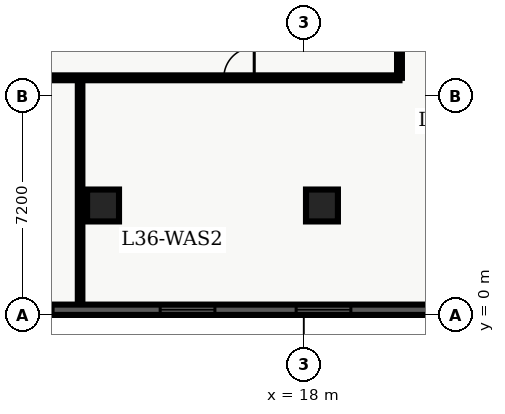
"""IFC4 building model, lengths in metres.
Left out: names, types, materials, properties, quantities, classifications, styles, units other than length and angle.
Written with IfcOpenShell. Run it as: python <this file> out.ifc"""

import sys

from ifc_helpers import new_model, entity, si_unit, converted_unit, direction, frame, origin_with_axes, origin_2d_with_axis, place, context, subcontext, project, spatial, polyline, rectangle, outline, extrude, element, fill, save


model = new_model("IFC4")
c1 = context("Model", 3, precision=1e-05, world=origin_with_axes(), true_north=direction((0.0, 1.0)))
c2 = subcontext(c1, "Body", "Model", "MODEL_VIEW")
j1 = project(units=[si_unit("LENGTHUNIT", "METRE"), converted_unit("PLANEANGLEUNIT", "DEGREE", entity("IfcPlaneAngleMeasure", 0.017), si_unit("PLANEANGLEUNIT", "RADIAN"), dimensions=[0, 0, 0, 0, 0, 0, 0])], contexts=[c1])
p1 = place(None, origin_with_axes())
s1 = spatial("IfcSite", under=j1, at=p1, CompositionType="ELEMENT")
p2 = place(p1, origin_with_axes())
s2 = spatial("IfcBuilding", under=s1, at=p2, CompositionType="ELEMENT")
p3 = place(p2, frame((0.0, 0.0, 148.5), z_axis=(0.0, 0.0, 1.0), x_axis=(1.0, 0.0, 0.0)))
s3 = spatial("IfcBuildingStorey", under=s2, at=p3, CompositionType="ELEMENT", Elevation=148.5)
for number, where, z_axis, x_axis in (
    (1, (11.4, 3.6, 0.0), (0.0, 0.0, 1.0), (1.0, 0.0, 0.0)),
    (2, (18.6, 3.6, 0.0), (0.0, 0.0, 1.0), (1.0, 0.0, 0.0)),
):
    element("IfcColumn", number, at=place(p3, frame(where, z_axis=z_axis, x_axis=x_axis)), inside=s3, PredefinedType="COLUMN", context=c2, shape_type="SweptSolid", body=[
        extrude(rectangle(XDim=1.05, YDim=1.05, at=origin_2d_with_axis()), origin_with_axes(), (0.0, 0.0, 1.0), 3.9),
    ])
p4 = place(p3, frame((2.6, 7.8, 0.0), z_axis=(0.0, 0.0, 1.0), x_axis=(1.0, 0.0, 0.0)))
e3 = element("IfcWall", 3, at=p4, inside=s3, PredefinedType="PARTITIONING", context=c2, shape_type="SweptSolid", body=[
    extrude(outline(polyline([(0.0, -0.08), (18.55, -0.08), (18.55, 0.08), (0.0, 0.08), (0.0, -0.08)])), origin_with_axes(), (0.0, 0.0, 1.0), 2.7),
])
p5 = place(p4, frame((3.737, 0.0, 0.0), z_axis=(0.0, 0.0, 1.0), x_axis=(1.0, 0.0, 0.0)))
e4 = element("IfcOpeningElement", 4, at=p5, cuts=e3, PredefinedType="OPENING", context=c2, shape_type="SweptSolid", body=[
    extrude(rectangle(XDim=1.0, YDim=0.18, at=origin_2d_with_axis()), origin_with_axes(), (0.0, 0.0, 1.0), 2.15),
])
p6 = place(p4, frame((13.273, 0.0, 0.0), z_axis=(0.0, 0.0, 1.0), x_axis=(1.0, 0.0, 0.0)))
e5 = element("IfcOpeningElement", 5, at=p6, cuts=e3, PredefinedType="OPENING", context=c2, shape_type="SweptSolid", body=[
    extrude(rectangle(XDim=1.0, YDim=0.18, at=origin_2d_with_axis()), origin_with_axes(), (0.0, 0.0, 1.0), 2.15),
])
p7 = place(p3, frame((21.15, 7.8, 0.0), z_axis=(0.0, 0.0, 1.0), x_axis=(0.0, 1.0, 0.0)))
e6 = element("IfcWall", 6, at=p7, inside=s3, PredefinedType="PARTITIONING", context=c2, shape_type="SweptSolid", body=[
    extrude(outline(polyline([(0.0, -0.08), (32.7, -0.08), (32.7, 0.08), (0.0, 0.08), (0.0, -0.08)])), origin_with_axes(), (0.0, 0.0, 1.0), 2.7),
])
p8 = place(p7, frame((5.775, 0.0, 0.0), z_axis=(0.0, 0.0, 1.0), x_axis=(1.0, 0.0, 0.0)))
e7 = element("IfcOpeningElement", 7, at=p8, cuts=e6, PredefinedType="OPENING", context=c2, shape_type="SweptSolid", body=[
    extrude(rectangle(XDim=1.05, YDim=0.18, at=origin_2d_with_axis()), origin_with_axes(), (0.0, 0.0, 1.0), 2.15),
])
p9 = place(p3, frame((10.645, 0.335, 0.0), z_axis=(0.0, 0.0, 1.0), x_axis=(0.0, 1.0, 0.0)))
e8 = element("IfcWall", 8, at=p9, inside=s3, PredefinedType="PARTITIONING", context=c2, shape_type="SweptSolid", body=[
    extrude(outline(polyline([(0.0, -0.075), (7.365, -0.075), (7.365, 0.075), (0.0, 0.075), (0.0, -0.075)])), origin_with_axes(), (0.0, 0.0, 1.0), 2.7),
])
p10 = place(p3, frame((57.26, 0.17, 0.0), z_axis=(0.0, 0.0, 1.0), x_axis=(-1.0, 0.0, 0.0)))
e9 = element("IfcWall", 9, at=p10, inside=s3, PredefinedType="SOLIDWALL", context=c2, shape_type="SweptSolid", body=[
    extrude(outline(polyline([(0.0, -0.17), (54.86, -0.17), (54.86, 0.17), (0.0, 0.17), (0.0, -0.17)])), origin_with_axes(), (0.0, 0.0, 1.0), 3.66),
])
p11 = place(p10, frame((2.836, 0.0, 0.45), z_axis=(0.0, 0.0, 1.0), x_axis=(1.0, 0.0, 0.0)))
e10 = element("IfcOpeningElement", 10, at=p11, cuts=e9, PredefinedType="OPENING", context=c2, shape_type="SweptSolid", body=[
    extrude(rectangle(XDim=1.8, YDim=0.36, at=origin_2d_with_axis()), origin_with_axes(), (0.0, 0.0, 1.0), 2.1),
])
p12 = place(p10, frame((7.307, 0.0, 0.45), z_axis=(0.0, 0.0, 1.0), x_axis=(1.0, 0.0, 0.0)))
e11 = element("IfcOpeningElement", 11, at=p12, cuts=e9, PredefinedType="OPENING", context=c2, shape_type="SweptSolid", body=[
    extrude(rectangle(XDim=1.8, YDim=0.36, at=origin_2d_with_axis()), origin_with_axes(), (0.0, 0.0, 1.0), 2.1),
])
p13 = place(p10, frame((11.779, 0.0, 0.45), z_axis=(0.0, 0.0, 1.0), x_axis=(1.0, 0.0, 0.0)))
e12 = element("IfcOpeningElement", 12, at=p13, cuts=e9, PredefinedType="OPENING", context=c2, shape_type="SweptSolid", body=[
    extrude(rectangle(XDim=1.8, YDim=0.36, at=origin_2d_with_axis()), origin_with_axes(), (0.0, 0.0, 1.0), 2.1),
])
p14 = place(p10, frame((16.251, 0.0, 0.45), z_axis=(0.0, 0.0, 1.0), x_axis=(1.0, 0.0, 0.0)))
e13 = element("IfcOpeningElement", 13, at=p14, cuts=e9, PredefinedType="OPENING", context=c2, shape_type="SweptSolid", body=[
    extrude(rectangle(XDim=1.8, YDim=0.36, at=origin_2d_with_axis()), origin_with_axes(), (0.0, 0.0, 1.0), 2.1),
])
p15 = place(p10, frame((20.723, 0.0, 0.45), z_axis=(0.0, 0.0, 1.0), x_axis=(1.0, 0.0, 0.0)))
e14 = element("IfcOpeningElement", 14, at=p15, cuts=e9, PredefinedType="OPENING", context=c2, shape_type="SweptSolid", body=[
    extrude(rectangle(XDim=1.8, YDim=0.36, at=origin_2d_with_axis()), origin_with_axes(), (0.0, 0.0, 1.0), 2.1),
])
p16 = place(p10, frame((25.194, 0.0, 0.45), z_axis=(0.0, 0.0, 1.0), x_axis=(1.0, 0.0, 0.0)))
e15 = element("IfcOpeningElement", 15, at=p16, cuts=e9, PredefinedType="OPENING", context=c2, shape_type="SweptSolid", body=[
    extrude(rectangle(XDim=1.8, YDim=0.36, at=origin_2d_with_axis()), origin_with_axes(), (0.0, 0.0, 1.0), 2.1),
])
p17 = place(p10, frame((29.666, 0.0, 0.45), z_axis=(0.0, 0.0, 1.0), x_axis=(1.0, 0.0, 0.0)))
e16 = element("IfcOpeningElement", 16, at=p17, cuts=e9, PredefinedType="OPENING", context=c2, shape_type="SweptSolid", body=[
    extrude(rectangle(XDim=1.8, YDim=0.36, at=origin_2d_with_axis()), origin_with_axes(), (0.0, 0.0, 1.0), 2.1),
])
p18 = place(p10, frame((34.138, 0.0, 0.45), z_axis=(0.0, 0.0, 1.0), x_axis=(1.0, 0.0, 0.0)))
e17 = element("IfcOpeningElement", 17, at=p18, cuts=e9, PredefinedType="OPENING", context=c2, shape_type="SweptSolid", body=[
    extrude(rectangle(XDim=1.8, YDim=0.36, at=origin_2d_with_axis()), origin_with_axes(), (0.0, 0.0, 1.0), 2.1),
])
p19 = place(p10, frame((38.609, 0.0, 0.45), z_axis=(0.0, 0.0, 1.0), x_axis=(1.0, 0.0, 0.0)))
e18 = element("IfcOpeningElement", 18, at=p19, cuts=e9, PredefinedType="OPENING", context=c2, shape_type="SweptSolid", body=[
    extrude(rectangle(XDim=1.8, YDim=0.36, at=origin_2d_with_axis()), origin_with_axes(), (0.0, 0.0, 1.0), 2.1),
])
p20 = place(p10, frame((43.081, 0.0, 0.45), z_axis=(0.0, 0.0, 1.0), x_axis=(1.0, 0.0, 0.0)))
e19 = element("IfcOpeningElement", 19, at=p20, cuts=e9, PredefinedType="OPENING", context=c2, shape_type="SweptSolid", body=[
    extrude(rectangle(XDim=1.8, YDim=0.36, at=origin_2d_with_axis()), origin_with_axes(), (0.0, 0.0, 1.0), 2.1),
])
p21 = place(p10, frame((48.403, 0.0, 0.45), z_axis=(0.0, 0.0, 1.0), x_axis=(1.0, 0.0, 0.0)))
e20 = element("IfcOpeningElement", 20, at=p21, cuts=e9, PredefinedType="OPENING", context=c2, shape_type="SweptSolid", body=[
    extrude(rectangle(XDim=1.8, YDim=0.36, at=origin_2d_with_axis()), origin_with_axes(), (0.0, 0.0, 1.0), 2.1),
])
p22 = place(p10, frame((52.024, 0.0, 0.45), z_axis=(0.0, 0.0, 1.0), x_axis=(1.0, 0.0, 0.0)))
e21 = element("IfcOpeningElement", 21, at=p22, cuts=e9, PredefinedType="OPENING", context=c2, shape_type="SweptSolid", body=[
    extrude(rectangle(XDim=1.8, YDim=0.36, at=origin_2d_with_axis()), origin_with_axes(), (0.0, 0.0, 1.0), 2.1),
])
p23 = place(p4, frame((13.273, 0.0, 0.0), z_axis=(0.0, 0.0, 1.0), x_axis=(1.0, 0.0, 0.0)))
e22 = element("IfcDoor", 22, at=p23, inside=s3, OperationType="SINGLE_SWING_RIGHT", PredefinedType="DOOR", context=c2, shape_type="SweptSolid", body=[
    extrude(rectangle(XDim=1.0, YDim=0.09, at=origin_2d_with_axis()), origin_with_axes(), (0.0, 0.0, 1.0), 2.15),
])
fill(e5, e22)
p24 = place(p10, frame((38.609, 0.0, 0.45), z_axis=(0.0, 0.0, 1.0), x_axis=(1.0, 0.0, 0.0)))
e23 = element("IfcWindow", 23, at=p24, inside=s3, PredefinedType="WINDOW", context=c2, shape_type="SweptSolid", body=[
    extrude(rectangle(XDim=1.8, YDim=0.09, at=origin_2d_with_axis()), origin_with_axes(), (0.0, 0.0, 1.0), 2.1),
])
fill(e18, e23)
p25 = place(p10, frame((43.081, 0.0, 0.45), z_axis=(0.0, 0.0, 1.0), x_axis=(1.0, 0.0, 0.0)))
e24 = element("IfcWindow", 24, at=p25, inside=s3, PredefinedType="WINDOW", context=c2, shape_type="SweptSolid", body=[
    extrude(rectangle(XDim=1.8, YDim=0.09, at=origin_2d_with_axis()), origin_with_axes(), (0.0, 0.0, 1.0), 2.1),
])
fill(e19, e24)
p26 = place(p10, frame((48.403, 0.0, 0.45), z_axis=(0.0, 0.0, 1.0), x_axis=(1.0, 0.0, 0.0)))
e25 = element("IfcWindow", 25, at=p26, inside=s3, PredefinedType="WINDOW", context=c2, shape_type="SweptSolid", body=[
    extrude(rectangle(XDim=1.8, YDim=0.09, at=origin_2d_with_axis()), origin_with_axes(), (0.0, 0.0, 1.0), 2.1),
])
fill(e20, e25)
save(model, sys.argv[1])
